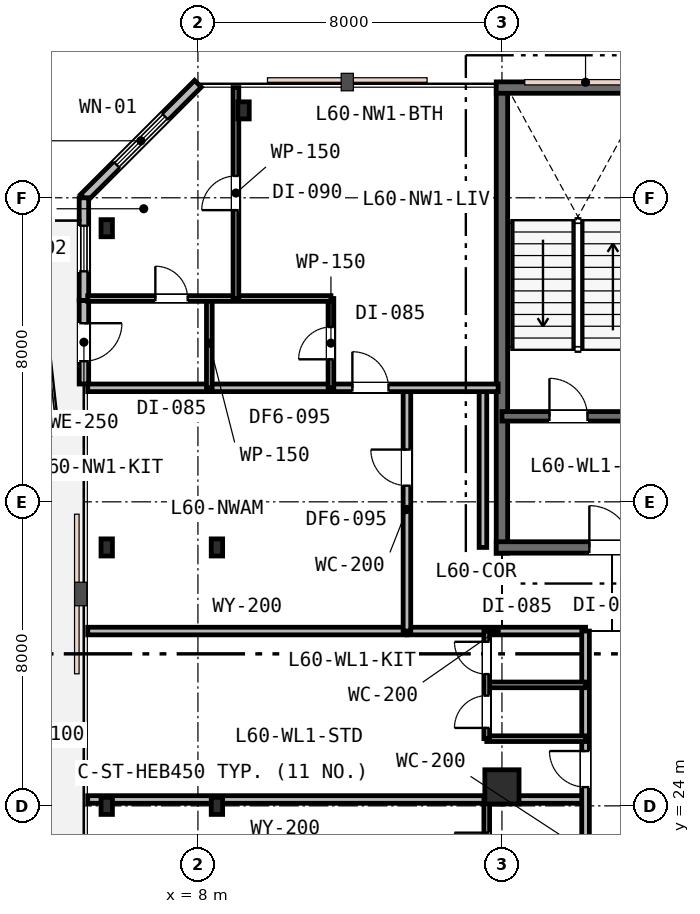
"""IFC4 building model, lengths in metres.
Left out: names, types, materials, properties, quantities, classifications, styles, units other than length and angle.
Written with IfcOpenShell. Run it as: python <this file> out.ifc"""

import sys

from ifc_helpers import new_model, si_unit, direction, frame, frame_2d, origin, origin_2d, place, context, subcontext, project, spatial, rectangle, i_section, extrude, element, fill, save


model = new_model("IFC4")
c1 = context("Model", 3, precision=1e-05, world=origin(), true_north=direction((0.0, 1.0)))
c2 = subcontext(c1, "Body", "Model", "MODEL_VIEW")
j1 = project(units=[si_unit("LENGTHUNIT", "METRE"), si_unit("PLANEANGLEUNIT", "RADIAN")], contexts=[c1])
p1 = place(None, origin())
s1 = spatial("IfcSite", under=j1, at=p1, CompositionType="ELEMENT")
p2 = place(p1, origin())
s2 = spatial("IfcBuilding", under=s1, at=p2, CompositionType="ELEMENT")
p3 = place(p2, frame((0.0, 0.0, 233.6)))
s3 = spatial("IfcBuildingStorey", under=s2, at=p3, CompositionType="ELEMENT", Elevation=233.6)
p4 = place(p3, frame((16.0, 30.65, 0.0), z_axis=(0.0, 0.0, 1.0), x_axis=(0.0, 1.0, 0.0)))
e1 = element("IfcWall", 1, at=p4, inside=s3, PredefinedType="SHEAR", context=c2, shape_type="SweptSolid", body=[
    extrude(rectangle(XDim=12.3, YDim=0.3, at=frame_2d((6.15, 0.0))), origin(), (0.0, 0.0, 1.0), 3.8),
])
p5 = place(p3, frame((15.85, 42.9, 0.0), z_axis=(0.0, 0.0, 1.0), x_axis=(1.0, 0.0, 0.0)))
e2 = element("IfcWall", 2, at=p5, inside=s3, PredefinedType="SHEAR", context=c2, shape_type="SweptSolid", body=[
    extrude(rectangle(XDim=24.3, YDim=0.3, at=frame_2d((12.15, 0.0))), origin(), (0.0, 0.0, 1.0), 3.8),
])
p6 = place(p3, frame((15.85, 30.8, 0.0), z_axis=(0.0, 0.0, 1.0), x_axis=(1.0, 0.0, 0.0)))
e3 = element("IfcWall", 3, at=p6, inside=s3, PredefinedType="SHEAR", context=c2, shape_type="SweptSolid", body=[
    extrude(rectangle(XDim=11.2, YDim=0.3, at=frame_2d((5.6, 0.0))), origin(), (0.0, 0.0, 1.0), 3.8),
])
p7 = place(p6, frame((2.45, 0.0, 0.0)))
e4 = element("IfcOpeningElement", 4, at=p7, cuts=e3, PredefinedType="OPENING", context=c2, shape_type="SweptSolid", body=[
    extrude(rectangle(XDim=1.1, YDim=2.15, at=frame_2d((0.55, 1.075))), frame((0.0, 0.16, 0.0), z_axis=(0.0, -1.0, 0.0), x_axis=(1.0, 0.0, 0.0)), (0.0, 0.0, 1.0), 0.32),
])
p8 = place(p3, frame((16.0, 34.25, 0.0), z_axis=(0.0, 0.0, 1.0), x_axis=(1.0, 0.0, 0.0)))
e5 = element("IfcWall", 5, at=p8, inside=s3, PredefinedType="SHEAR", context=c2, shape_type="SweptSolid", body=[
    extrude(rectangle(XDim=6.05, YDim=0.25, at=frame_2d((3.025, 0.0))), origin(), (0.0, 0.0, 1.0), 3.8),
])
p9 = place(p8, frame((1.25, 0.0, 0.0)))
e6 = element("IfcOpeningElement", 6, at=p9, cuts=e5, PredefinedType="OPENING", context=c2, shape_type="SweptSolid", body=[
    extrude(rectangle(XDim=1.0, YDim=2.15, at=frame_2d((0.5, 1.075))), frame((0.0, 0.135, 0.0), z_axis=(0.0, -1.0, 0.0), x_axis=(1.0, 0.0, 0.0)), (0.0, 0.0, 1.0), 0.27),
])
p10 = place(p8, frame((4.2, 0.0, 0.0)))
e7 = element("IfcOpeningElement", 7, at=p10, cuts=e5, PredefinedType="OPENING", context=c2, shape_type="SweptSolid", body=[
    extrude(rectangle(XDim=1.1, YDim=2.15, at=frame_2d((0.55, 1.075))), frame((0.0, 0.135, 0.0), z_axis=(0.0, -1.0, 0.0), x_axis=(1.0, 0.0, 0.0)), (0.0, 0.0, 1.0), 0.27),
])
p11 = place(p3, frame((8.5, 24.0, 0.0), z_axis=(0.0, 0.0, 1.0), x_axis=(1.0, 0.0, 0.0)))
e8 = element("IfcColumn", 8, at=p11, inside=s3, PredefinedType="COLUMN", context=c2, shape_type="SweptSolid", body=[
    extrude(i_section(OverallWidth=0.3, OverallDepth=0.45, WebThickness=0.014, FlangeThickness=0.026, FilletRadius=0.027, at=origin_2d()), origin(), (0.0, 0.0, 1.0), 3.8),
])
p12 = place(p3, frame((16.0, 24.5, 0.0), z_axis=(0.0, 0.0, 1.0), x_axis=(1.0, 0.0, 0.0)))
e9 = element("IfcColumn", 9, at=p12, inside=s3, PredefinedType="COLUMN", context=c2, shape_type="SweptSolid", body=[
    extrude(rectangle(XDim=0.9, YDim=0.9, at=origin_2d()), origin(), (0.0, 0.0, 1.0), 3.8),
])
for number, where, z_axis, x_axis in (
    (10, (5.6, 24.0, 0.0), (0.0, 0.0, 1.0), (1.0, 0.0, 0.0)),
    (11, (5.6, 30.8, 0.0), (0.0, 0.0, 1.0), (1.0, 0.0, 0.0)),
    (12, (5.6, 39.2, 0.0), (0.0, 0.0, 1.0), (1.0, 0.0, 0.0)),
    (13, (8.5, 30.8, 0.0), (0.0, 0.0, 1.0), (1.0, 0.0, 0.0)),
    (14, (9.2, 42.3, 0.0), (0.0, 0.0, 1.0), (1.0, 0.0, 0.0)),
):
    element("IfcColumn", number, at=place(p3, frame(where, z_axis=z_axis, x_axis=x_axis)), inside=s3, PredefinedType="COLUMN", context=c2, shape_type="SweptSolid", body=[
        extrude(i_section(OverallWidth=0.3, OverallDepth=0.45, WebThickness=0.014, FlangeThickness=0.026, FilletRadius=0.027, at=origin_2d()), origin(), (0.0, 0.0, 1.0), 3.8),
    ])
p13 = place(p3, frame((8.0, 43.0, 0.0), z_axis=(0.0, 0.0, 1.0), x_axis=(-0.707106781187, -0.707106781187, 0.0)))
e15 = element("IfcWall", 15, at=p13, inside=s3, PredefinedType="STANDARD", context=c2, shape_type="SweptSolid", body=[
    extrude(rectangle(XDim=4.243, YDim=0.25, at=frame_2d((2.121, 0.0))), origin(), (0.0, 0.0, 1.0), 3.53),
])
p14 = place(p13, frame((1.221, 0.0, 0.75)))
e16 = element("IfcOpeningElement", 16, at=p14, cuts=e15, PredefinedType="OPENING", context=c2, shape_type="SweptSolid", body=[
    extrude(rectangle(XDim=1.8, YDim=1.85, at=frame_2d((0.9, 0.925))), frame((0.0, 0.135, 0.0), z_axis=(0.0, -1.0, 0.0), x_axis=(1.0, 0.0, 0.0)), (0.0, 0.0, 1.0), 0.27),
])
p15 = place(p3, frame((5.0, 37.3, 0.0), z_axis=(0.0, 0.0, 1.0), x_axis=(0.0, -1.0, 0.0)))
e17 = element("IfcWall", 17, at=p15, inside=s3, PredefinedType="STANDARD", context=c2, shape_type="SweptSolid", body=[
    extrude(rectangle(XDim=2.2, YDim=0.25, at=frame_2d((1.1, 0.0))), origin(), (0.0, 0.0, 1.0), 3.53),
])
p16 = place(p15, frame((0.6, 0.0, 0.0)))
e18 = element("IfcOpeningElement", 18, at=p16, cuts=e17, PredefinedType="OPENING", context=c2, shape_type="SweptSolid", body=[
    extrude(rectangle(XDim=1.0, YDim=2.15, at=frame_2d((0.5, 1.075))), frame((0.0, 0.135, 0.0), z_axis=(0.0, -1.0, 0.0), x_axis=(1.0, 0.0, 0.0)), (0.0, 0.0, 1.0), 0.27),
])
p17 = place(p3, frame((5.0, 40.0, 0.0), z_axis=(0.0, 0.0, 1.0), x_axis=(0.0, -1.0, 0.0)))
e19 = element("IfcWall", 19, at=p17, inside=s3, PredefinedType="STANDARD", context=c2, shape_type="SweptSolid", body=[
    extrude(rectangle(XDim=2.7, YDim=0.25, at=frame_2d((1.35, 0.0))), origin(), (0.0, 0.0, 1.0), 3.53),
])
p18 = place(p17, frame((0.735, 0.0, 0.85)))
e20 = element("IfcOpeningElement", 20, at=p18, cuts=e19, PredefinedType="OPENING", context=c2, shape_type="SweptSolid", body=[
    extrude(rectangle(XDim=1.2, YDim=1.6, at=frame_2d((0.6, 0.8))), frame((0.0, 0.135, 0.0), z_axis=(0.0, -1.0, 0.0), x_axis=(1.0, 0.0, 0.0)), (0.0, 0.0, 1.0), 0.27),
])
p19 = place(p3, frame((5.1, 28.6, 0.0), z_axis=(0.0, 0.0, 1.0), x_axis=(1.0, 0.0, 0.0)))
e21 = element("IfcWall", 21, at=p19, inside=s3, PredefinedType="PARTITIONING", context=c2, shape_type="SweptSolid", body=[
    extrude(rectangle(XDim=8.4, YDim=0.2, at=frame_2d((4.2, 0.0))), origin(), (0.0, 0.0, 1.0), 2.92),
])
p20 = place(p3, frame((13.5, 28.6, 0.0), z_axis=(0.0, 0.0, 1.0), x_axis=(1.0, 0.0, 0.0)))
e22 = element("IfcWall", 22, at=p20, inside=s3, PredefinedType="PARTITIONING", context=c2, shape_type="SweptSolid", body=[
    extrude(rectangle(XDim=4.7, YDim=0.2, at=frame_2d((2.35, 0.0))), origin(), (0.0, 0.0, 1.0), 2.92),
])
p21 = place(p3, frame((15.5, 30.8, 0.0), z_axis=(0.0, 0.0, 1.0), x_axis=(0.0, 1.0, 0.0)))
e23 = element("IfcWall", 23, at=p21, inside=s3, PredefinedType="PARTITIONING", context=c2, shape_type="SweptSolid", body=[
    extrude(rectangle(XDim=4.2, YDim=0.2, at=frame_2d((2.1, 0.0))), origin(), (0.0, 0.0, 1.0), 2.92),
])
p22 = place(p3, frame((13.5, 28.6, 0.0), z_axis=(0.0, 0.0, 1.0), x_axis=(0.0, 1.0, 0.0)))
e24 = element("IfcWall", 24, at=p22, inside=s3, PredefinedType="PARTITIONING", context=c2, shape_type="SweptSolid", body=[
    extrude(rectangle(XDim=6.4, YDim=0.2, at=frame_2d((3.2, 0.0))), origin(), (0.0, 0.0, 1.0), 2.92),
])
p23 = place(p22, frame((3.825, 0.0, 0.0)))
e25 = element("IfcOpeningElement", 25, at=p23, cuts=e24, PredefinedType="OPENING", context=c2, shape_type="SweptSolid", body=[
    extrude(rectangle(XDim=0.95, YDim=2.15, at=frame_2d((0.475, 1.075))), frame((0.0, 0.11, 0.0), z_axis=(0.0, -1.0, 0.0), x_axis=(1.0, 0.0, 0.0)), (0.0, 0.0, 1.0), 0.22),
])
p24 = place(p3, frame((5.1, 35.0, 0.0), z_axis=(0.0, 0.0, 1.0), x_axis=(1.0, 0.0, 0.0)))
e26 = element("IfcWall", 26, at=p24, inside=s3, PredefinedType="PARTITIONING", context=c2, shape_type="SweptSolid", body=[
    extrude(rectangle(XDim=10.8, YDim=0.2, at=frame_2d((5.4, 0.0))), origin(), (0.0, 0.0, 1.0), 3.24),
])
p25 = place(p24, frame((6.964, 0.0, 0.0)))
e27 = element("IfcOpeningElement", 27, at=p25, cuts=e26, PredefinedType="OPENING", context=c2, shape_type="SweptSolid", body=[
    extrude(rectangle(XDim=0.95, YDim=2.15, at=frame_2d((0.475, 1.075))), frame((0.0, 0.11, 0.0), z_axis=(0.0, -1.0, 0.0), x_axis=(1.0, 0.0, 0.0)), (0.0, 0.0, 1.0), 0.22),
])
p26 = place(p3, frame((11.5, 35.0, 0.0), z_axis=(0.0, 0.0, 1.0), x_axis=(0.0, 1.0, 0.0)))
e28 = element("IfcWall", 28, at=p26, inside=s3, PredefinedType="PARTITIONING", context=c2, shape_type="SweptSolid", body=[
    extrude(rectangle(XDim=2.35, YDim=0.15, at=frame_2d((1.175, 0.0))), origin(), (0.0, 0.0, 1.0), 3.53),
])
p27 = place(p26, frame((0.75, 0.0, 0.0)))
e29 = element("IfcOpeningElement", 29, at=p27, cuts=e28, PredefinedType="OPENING", context=c2, shape_type="SweptSolid", body=[
    extrude(rectangle(XDim=0.85, YDim=2.15, at=frame_2d((0.425, 1.075))), frame((0.0, 0.085, 0.0), z_axis=(0.0, -1.0, 0.0), x_axis=(1.0, 0.0, 0.0)), (0.0, 0.0, 1.0), 0.17),
])
p28 = place(p3, frame((8.3, 35.0, 0.0), z_axis=(0.0, 0.0, 1.0), x_axis=(0.0, 1.0, 0.0)))
e30 = element("IfcWall", 30, at=p28, inside=s3, PredefinedType="PARTITIONING", context=c2, shape_type="SweptSolid", body=[
    extrude(rectangle(XDim=2.35, YDim=0.15, at=frame_2d((1.175, 0.0))), origin(), (0.0, 0.0, 1.0), 3.53),
])
p29 = place(p3, frame((5.1, 37.35, 0.0), z_axis=(0.0, 0.0, 1.0), x_axis=(1.0, 0.0, 0.0)))
e31 = element("IfcWall", 31, at=p29, inside=s3, PredefinedType="PARTITIONING", context=c2, shape_type="SweptSolid", body=[
    extrude(rectangle(XDim=6.4, YDim=0.15, at=frame_2d((3.2, 0.0))), origin(), (0.0, 0.0, 1.0), 3.24),
])
p30 = place(p29, frame((1.78, 0.0, 0.0)))
e32 = element("IfcOpeningElement", 32, at=p30, cuts=e31, PredefinedType="OPENING", context=c2, shape_type="SweptSolid", body=[
    extrude(rectangle(XDim=0.85, YDim=2.15, at=frame_2d((0.425, 1.075))), frame((0.0, 0.085, 0.0), z_axis=(0.0, -1.0, 0.0), x_axis=(1.0, 0.0, 0.0)), (0.0, 0.0, 1.0), 0.17),
])
p31 = place(p3, frame((9.0, 37.35, 0.0), z_axis=(0.0, 0.0, 1.0), x_axis=(0.0, 1.0, 0.0)))
e33 = element("IfcWall", 33, at=p31, inside=s3, PredefinedType="PARTITIONING", context=c2, shape_type="SweptSolid", body=[
    extrude(rectangle(XDim=5.55, YDim=0.15, at=frame_2d((2.775, 0.0))), origin(), (0.0, 0.0, 1.0), 3.24),
])
p32 = place(p31, frame((2.325, 0.0, 0.0)))
e34 = element("IfcOpeningElement", 34, at=p32, cuts=e33, PredefinedType="OPENING", context=c2, shape_type="SweptSolid", body=[
    extrude(rectangle(XDim=0.9, YDim=2.15, at=frame_2d((0.45, 1.075))), frame((0.0, 0.085, 0.0), z_axis=(0.0, -1.0, 0.0), x_axis=(1.0, 0.0, 0.0)), (0.0, 0.0, 1.0), 0.17),
])
p33 = place(p3, frame((5.1, 24.168, 0.0), z_axis=(0.0, 0.0, 1.0), x_axis=(1.0, 0.0, 0.0)))
e35 = element("IfcWall", 35, at=p33, inside=s3, PredefinedType="PARTITIONING", context=c2, shape_type="SweptSolid", body=[
    extrude(rectangle(XDim=13.1, YDim=0.2, at=frame_2d((6.55, 0.0))), origin(), (0.0, 0.0, 1.0), 2.92),
])
p34 = place(p3, frame((18.2, 17.0, 0.0), z_axis=(0.0, 0.0, 1.0), x_axis=(0.0, 1.0, 0.0)))
e36 = element("IfcWall", 36, at=p34, inside=s3, PredefinedType="PARTITIONING", context=c2, shape_type="SweptSolid", body=[
    extrude(rectangle(XDim=11.6, YDim=0.2, at=frame_2d((5.8, 0.0))), origin(), (0.0, 0.0, 1.0), 2.92),
])
p35 = place(p34, frame((7.493, 0.0, 0.0)))
e37 = element("IfcOpeningElement", 37, at=p35, cuts=e36, PredefinedType="OPENING", context=c2, shape_type="SweptSolid", body=[
    extrude(rectangle(XDim=0.95, YDim=2.15, at=frame_2d((0.475, 1.075))), frame((0.0, 0.11, 0.0), z_axis=(0.0, -1.0, 0.0), x_axis=(1.0, 0.0, 0.0)), (0.0, 0.0, 1.0), 0.22),
])
p36 = place(p34, frame((0.909, 0.0, 0.0)))
e38 = element("IfcOpeningElement", 38, at=p36, cuts=e36, PredefinedType="OPENING", context=c2, shape_type="SweptSolid", body=[
    extrude(rectangle(XDim=0.95, YDim=2.15, at=frame_2d((0.475, 1.075))), frame((0.0, 0.11, 0.0), z_axis=(0.0, -1.0, 0.0), x_axis=(1.0, 0.0, 0.0)), (0.0, 0.0, 1.0), 0.22),
])
for number, where, z_axis, x_axis in (
    (39, (15.6, 25.768, 0.0), (0.0, 0.0, 1.0), (1.0, 0.0, 0.0)),
    (40, (15.6, 27.184, 0.0), (0.0, 0.0, 1.0), (1.0, 0.0, 0.0)),
):
    element("IfcWall", number, at=place(p3, frame(where, z_axis=z_axis, x_axis=x_axis)), inside=s3, PredefinedType="PARTITIONING", context=c2, shape_type="SweptSolid", body=[
        extrude(rectangle(XDim=2.6, YDim=0.15, at=frame_2d((1.3, 0.0))), origin(), (0.0, 0.0, 1.0), 2.92),
    ])
p37 = place(p3, frame((15.6, 25.768, 0.0), z_axis=(0.0, 0.0, 1.0), x_axis=(0.0, 1.0, 0.0)))
e41 = element("IfcWall", 41, at=p37, inside=s3, PredefinedType="PARTITIONING", context=c2, shape_type="SweptSolid", body=[
    extrude(rectangle(XDim=2.832, YDim=0.15, at=frame_2d((1.416, 0.0))), origin(), (0.0, 0.0, 1.0), 2.92),
])
p38 = place(p37, frame((0.283, 0.0, 0.0)))
e42 = element("IfcOpeningElement", 42, at=p38, cuts=e41, PredefinedType="OPENING", context=c2, shape_type="SweptSolid", body=[
    extrude(rectangle(XDim=0.85, YDim=2.15, at=frame_2d((0.425, 1.075))), frame((0.0, 0.085, 0.0), z_axis=(0.0, -1.0, 0.0), x_axis=(1.0, 0.0, 0.0)), (0.0, 0.0, 1.0), 0.17),
])
p39 = place(p37, frame((1.699, 0.0, 0.0)))
e43 = element("IfcOpeningElement", 43, at=p39, cuts=e41, PredefinedType="OPENING", context=c2, shape_type="SweptSolid", body=[
    extrude(rectangle(XDim=0.85, YDim=2.15, at=frame_2d((0.425, 1.075))), frame((0.0, 0.085, 0.0), z_axis=(0.0, -1.0, 0.0), x_axis=(1.0, 0.0, 0.0)), (0.0, 0.0, 1.0), 0.17),
])
p40 = place(p3, frame((15.6, 19.768, 0.0), z_axis=(0.0, 0.0, 1.0), x_axis=(0.0, 1.0, 0.0)))
e44 = element("IfcWall", 44, at=p40, inside=s3, PredefinedType="PARTITIONING", context=c2, shape_type="SweptSolid", body=[
    extrude(rectangle(XDim=4.4, YDim=0.15, at=frame_2d((2.2, 0.0))), origin(), (0.0, 0.0, 1.0), 2.92),
])
p41 = place(p40, frame((0.675, 0.0, 0.0)))
e45 = element("IfcOpeningElement", 45, at=p41, cuts=e44, PredefinedType="OPENING", context=c2, shape_type="SweptSolid", body=[
    extrude(rectangle(XDim=0.85, YDim=2.15, at=frame_2d((0.425, 1.075))), frame((0.0, 0.085, 0.0), z_axis=(0.0, -1.0, 0.0), x_axis=(1.0, 0.0, 0.0)), (0.0, 0.0, 1.0), 0.17),
])
p42 = place(p40, frame((2.677, 0.0, 0.0)))
e46 = element("IfcOpeningElement", 46, at=p42, cuts=e44, PredefinedType="OPENING", context=c2, shape_type="SweptSolid", body=[
    extrude(rectangle(XDim=0.85, YDim=2.15, at=frame_2d((0.425, 1.075))), frame((0.0, 0.085, 0.0), z_axis=(0.0, -1.0, 0.0), x_axis=(1.0, 0.0, 0.0)), (0.0, 0.0, 1.0), 0.17),
])
p43 = place(p14, origin())
e47 = element("IfcWindow", 47, at=p43, inside=s3, PartitioningType="SINGLE_PANEL", PredefinedType="WINDOW", context=c2, shape_type="SweptSolid", body=[
    extrude(rectangle(XDim=1.8, YDim=1.85, at=frame_2d((0.9, 0.925))), frame((0.0, 0.03, 0.0), z_axis=(0.0, -1.0, 0.0), x_axis=(1.0, 0.0, 0.0)), (0.0, 0.0, 1.0), 0.06),
])
fill(e16, e47)
p44 = place(p16, origin())
e48 = element("IfcDoor", 48, at=p44, inside=s3, OperationType="SINGLE_SWING_LEFT", PredefinedType="DOOR", context=c2, shape_type="SweptSolid", body=[
    extrude(rectangle(XDim=1.0, YDim=2.15, at=frame_2d((0.5, 1.075))), frame((0.0, 0.025, 0.0), z_axis=(0.0, -1.0, 0.0), x_axis=(1.0, 0.0, 0.0)), (0.0, 0.0, 1.0), 0.05),
])
fill(e18, e48)
p45 = place(p18, origin())
e49 = element("IfcWindow", 49, at=p45, inside=s3, PartitioningType="SINGLE_PANEL", PredefinedType="WINDOW", context=c2, shape_type="SweptSolid", body=[
    extrude(rectangle(XDim=1.2, YDim=1.6, at=frame_2d((0.6, 0.8))), frame((0.0, 0.03, 0.0), z_axis=(0.0, -1.0, 0.0), x_axis=(1.0, 0.0, 0.0)), (0.0, 0.0, 1.0), 0.06),
])
fill(e20, e49)
p46 = place(p9, origin())
e50 = element("IfcDoor", 50, at=p46, inside=s3, OperationType="SINGLE_SWING_LEFT", PredefinedType="DOOR", context=c2, shape_type="SweptSolid", body=[
    extrude(rectangle(XDim=1.0, YDim=2.15, at=frame_2d((0.5, 1.075))), frame((0.0, 0.025, 0.0), z_axis=(0.0, -1.0, 0.0), x_axis=(1.0, 0.0, 0.0)), (0.0, 0.0, 1.0), 0.05),
])
fill(e6, e50)
p47 = place(p7, origin())
e51 = element("IfcDoor", 51, at=p47, inside=s3, OperationType="SINGLE_SWING_LEFT", PredefinedType="DOOR", context=c2, shape_type="SweptSolid", body=[
    extrude(rectangle(XDim=1.1, YDim=2.15, at=frame_2d((0.55, 1.075))), frame((0.0, 0.025, 0.0), z_axis=(0.0, -1.0, 0.0), x_axis=(1.0, 0.0, 0.0)), (0.0, 0.0, 1.0), 0.05),
])
fill(e4, e51)
p48 = place(p23, origin())
e52 = element("IfcDoor", 52, at=p48, inside=s3, OperationType="SINGLE_SWING_RIGHT", PredefinedType="DOOR", context=c2, shape_type="SweptSolid", body=[
    extrude(rectangle(XDim=0.95, YDim=2.15, at=frame_2d((0.475, 1.075))), frame((0.0, 0.025, 0.0), z_axis=(0.0, -1.0, 0.0), x_axis=(1.0, 0.0, 0.0)), (0.0, 0.0, 1.0), 0.05),
])
fill(e25, e52)
p49 = place(p25, origin())
e53 = element("IfcDoor", 53, at=p49, inside=s3, OperationType="SINGLE_SWING_LEFT", PredefinedType="DOOR", context=c2, shape_type="SweptSolid", body=[
    extrude(rectangle(XDim=0.95, YDim=2.15, at=frame_2d((0.475, 1.075))), frame((0.0, 0.025, 0.0), z_axis=(0.0, -1.0, 0.0), x_axis=(1.0, 0.0, 0.0)), (0.0, 0.0, 1.0), 0.05),
])
fill(e27, e53)
p50 = place(p27, origin())
e54 = element("IfcDoor", 54, at=p50, inside=s3, OperationType="SINGLE_SWING_LEFT", PredefinedType="DOOR", context=c2, shape_type="SweptSolid", body=[
    extrude(rectangle(XDim=0.85, YDim=2.15, at=frame_2d((0.425, 1.075))), frame((0.0, 0.025, 0.0), z_axis=(0.0, -1.0, 0.0), x_axis=(1.0, 0.0, 0.0)), (0.0, 0.0, 1.0), 0.05),
])
fill(e29, e54)
p51 = place(p30, origin())
e55 = element("IfcDoor", 55, at=p51, inside=s3, OperationType="SINGLE_SWING_LEFT", PredefinedType="DOOR", context=c2, shape_type="SweptSolid", body=[
    extrude(rectangle(XDim=0.85, YDim=2.15, at=frame_2d((0.425, 1.075))), frame((0.0, 0.025, 0.0), z_axis=(0.0, -1.0, 0.0), x_axis=(1.0, 0.0, 0.0)), (0.0, 0.0, 1.0), 0.05),
])
fill(e32, e55)
p52 = place(p32, origin())
e56 = element("IfcDoor", 56, at=p52, inside=s3, OperationType="SINGLE_SWING_LEFT", PredefinedType="DOOR", context=c2, shape_type="SweptSolid", body=[
    extrude(rectangle(XDim=0.9, YDim=2.15, at=frame_2d((0.45, 1.075))), frame((0.0, 0.025, 0.0), z_axis=(0.0, -1.0, 0.0), x_axis=(1.0, 0.0, 0.0)), (0.0, 0.0, 1.0), 0.05),
])
fill(e34, e56)
p53 = place(p35, origin())
e57 = element("IfcDoor", 57, at=p53, inside=s3, OperationType="SINGLE_SWING_RIGHT", PredefinedType="DOOR", context=c2, shape_type="SweptSolid", body=[
    extrude(rectangle(XDim=0.95, YDim=2.15, at=frame_2d((0.475, 1.075))), frame((0.0, 0.025, 0.0), z_axis=(0.0, -1.0, 0.0), x_axis=(1.0, 0.0, 0.0)), (0.0, 0.0, 1.0), 0.05),
])
fill(e37, e57)
p54 = place(p38, origin())
e58 = element("IfcDoor", 58, at=p54, inside=s3, OperationType="SINGLE_SWING_LEFT", PredefinedType="DOOR", context=c2, shape_type="SweptSolid", body=[
    extrude(rectangle(XDim=0.85, YDim=2.15, at=frame_2d((0.425, 1.075))), frame((0.0, 0.025, 0.0), z_axis=(0.0, -1.0, 0.0), x_axis=(1.0, 0.0, 0.0)), (0.0, 0.0, 1.0), 0.05),
])
fill(e42, e58)
p55 = place(p39, origin())
e59 = element("IfcDoor", 59, at=p55, inside=s3, OperationType="SINGLE_SWING_RIGHT", PredefinedType="DOOR", context=c2, shape_type="SweptSolid", body=[
    extrude(rectangle(XDim=0.85, YDim=2.15, at=frame_2d((0.425, 1.075))), frame((0.0, 0.025, 0.0), z_axis=(0.0, -1.0, 0.0), x_axis=(1.0, 0.0, 0.0)), (0.0, 0.0, 1.0), 0.05),
])
fill(e43, e59)
p56 = place(p42, origin())
e60 = element("IfcDoor", 60, at=p56, inside=s3, OperationType="SINGLE_SWING_RIGHT", PredefinedType="DOOR", context=c2, shape_type="SweptSolid", body=[
    extrude(rectangle(XDim=0.85, YDim=2.15, at=frame_2d((0.425, 1.075))), frame((0.0, 0.025, 0.0), z_axis=(0.0, -1.0, 0.0), x_axis=(1.0, 0.0, 0.0)), (0.0, 0.0, 1.0), 0.05),
])
fill(e46, e60)
save(model, sys.argv[1])
